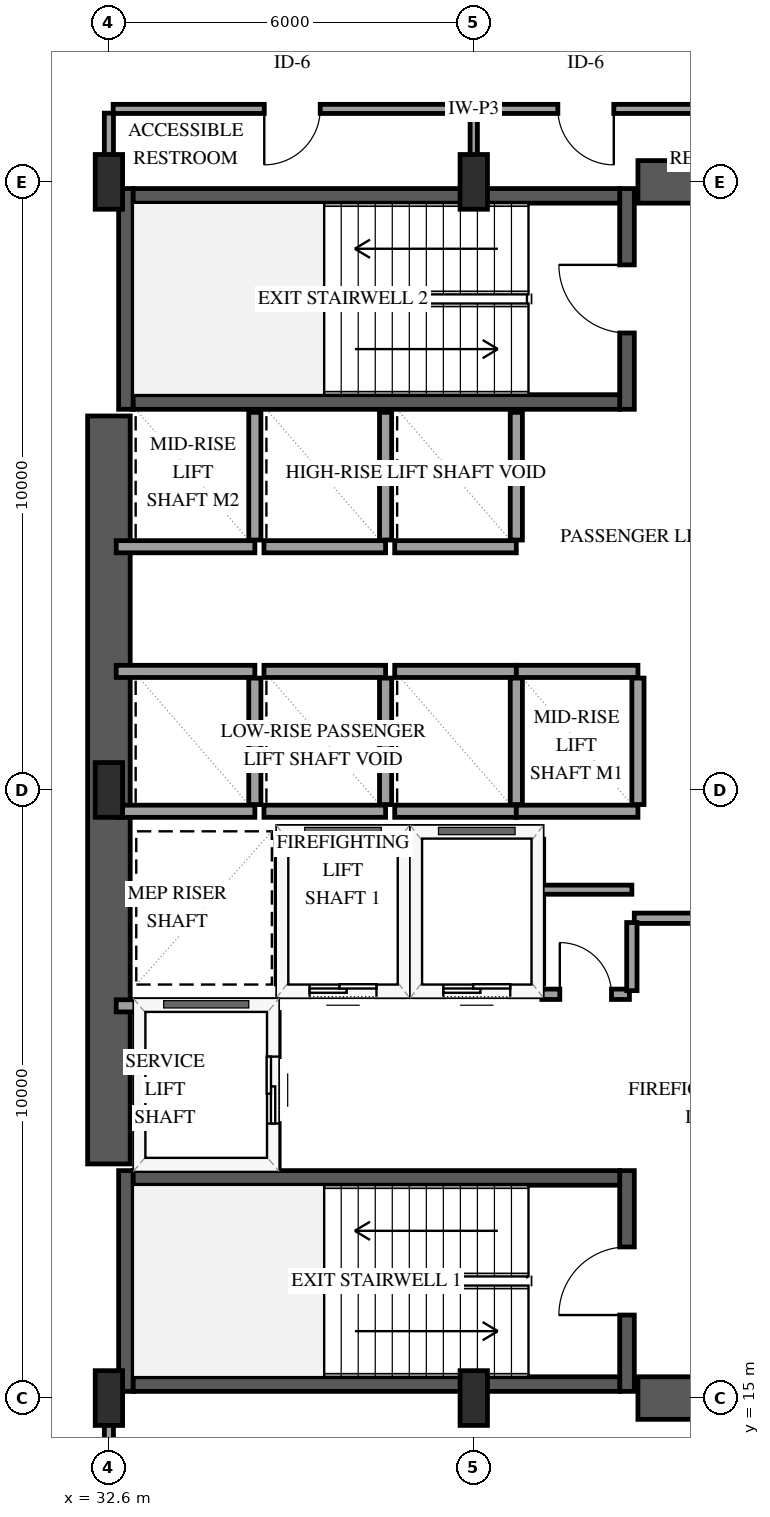
"""IFC4 building model, lengths in metres.
Left out: names, types, materials, properties, quantities, classifications, styles, units other than length and angle.
Written with IfcOpenShell. Run it as: python <this file> out.ifc"""

import sys

from ifc_helpers import new_model, si_unit, direction, frame, frame_2d, origin, origin_2d, place, context, subcontext, project, spatial, rectangle, extrude, element, fill, save


model = new_model("IFC4")
c1 = context("Model", 3, precision=1e-05, world=origin(), true_north=direction((0.0, 1.0)))
c2 = subcontext(c1, "Body", "Model", "MODEL_VIEW")
j1 = project(units=[si_unit("LENGTHUNIT", "METRE"), si_unit("PLANEANGLEUNIT", "RADIAN")], contexts=[c1])
p1 = place(None, origin())
s1 = spatial("IfcSite", under=j1, at=p1, CompositionType="ELEMENT")
p2 = place(p1, origin())
s2 = spatial("IfcBuilding", under=s1, at=p2, CompositionType="ELEMENT")
p3 = place(p2, frame((0.0, 0.0, 20.7)))
s3 = spatial("IfcBuildingStorey", under=s2, at=p3, CompositionType="ELEMENT", Elevation=20.7)
p4 = place(p3, frame((32.88, 15.11, 0.0), z_axis=(0.0, 0.0, 1.0), x_axis=(0.0, 1.0, 0.0)))
e1 = element("IfcWall", 1, at=p4, inside=s3, PredefinedType="SHEAR", context=c2, shape_type="SweptSolid", body=[
    extrude(rectangle(XDim=3.63, YDim=0.24, at=frame_2d((1.815, 0.0))), origin(), (0.0, 0.0, 1.0), 4.5),
])
p5 = place(p3, frame((41.12, 15.11, 0.0), z_axis=(0.0, 0.0, 1.0), x_axis=(0.0, 1.0, 0.0)))
e2 = element("IfcWall", 2, at=p5, inside=s3, PredefinedType="SHEAR", context=c2, shape_type="SweptSolid", body=[
    extrude(rectangle(XDim=3.63, YDim=0.24, at=frame_2d((1.815, 0.0))), origin(), (0.0, 0.0, 1.0), 4.5),
])
p6 = place(p5, frame((1.255, 0.0, 0.0)))
e3 = element("IfcOpeningElement", 3, at=p6, cuts=e2, PredefinedType="OPENING", context=c2, shape_type="SweptSolid", body=[
    extrude(rectangle(XDim=1.12, YDim=2.15, at=frame_2d((0.56, 1.075))), frame((0.0, 0.13, 0.0), z_axis=(0.0, -1.0, 0.0), x_axis=(1.0, 0.0, 0.0)), (0.0, 0.0, 1.0), 0.26),
])
for number, where, z_axis, x_axis in (
    (4, (33.0, 15.23, 0.0), (0.0, 0.0, 1.0), (1.0, 0.0, 0.0)),
    (5, (33.0, 18.62, 0.0), (0.0, 0.0, 1.0), (1.0, 0.0, 0.0)),
):
    element("IfcWall", number, at=place(p3, frame(where, z_axis=z_axis, x_axis=x_axis)), inside=s3, PredefinedType="SHEAR", context=c2, shape_type="SweptSolid", body=[
        extrude(rectangle(XDim=8.0, YDim=0.24, at=frame_2d((4.0, 0.0))), origin(), (0.0, 0.0, 1.0), 4.5),
    ])
p7 = place(p3, frame((32.88, 31.26, 0.0), z_axis=(0.0, 0.0, 1.0), x_axis=(0.0, 1.0, 0.0)))
e6 = element("IfcWall", 6, at=p7, inside=s3, PredefinedType="SHEAR", context=c2, shape_type="SweptSolid", body=[
    extrude(rectangle(XDim=3.63, YDim=0.24, at=frame_2d((1.815, 0.0))), origin(), (0.0, 0.0, 1.0), 4.5),
])
p8 = place(p3, frame((41.12, 31.26, 0.0), z_axis=(0.0, 0.0, 1.0), x_axis=(0.0, 1.0, 0.0)))
e7 = element("IfcWall", 7, at=p8, inside=s3, PredefinedType="SHEAR", context=c2, shape_type="SweptSolid", body=[
    extrude(rectangle(XDim=3.63, YDim=0.24, at=frame_2d((1.815, 0.0))), origin(), (0.0, 0.0, 1.0), 4.5),
])
p9 = place(p8, frame((1.255, 0.0, 0.0)))
e8 = element("IfcOpeningElement", 8, at=p9, cuts=e7, PredefinedType="OPENING", context=c2, shape_type="SweptSolid", body=[
    extrude(rectangle(XDim=1.12, YDim=2.15, at=frame_2d((0.56, 1.075))), frame((0.0, 0.13, 0.0), z_axis=(0.0, -1.0, 0.0), x_axis=(1.0, 0.0, 0.0)), (0.0, 0.0, 1.0), 0.26),
])
for number, where, z_axis, x_axis in (
    (9, (33.0, 31.38, 0.0), (0.0, 0.0, 1.0), (1.0, 0.0, 0.0)),
    (10, (33.0, 34.77, 0.0), (0.0, 0.0, 1.0), (1.0, 0.0, 0.0)),
):
    element("IfcWall", number, at=place(p3, frame(where, z_axis=z_axis, x_axis=x_axis)), inside=s3, PredefinedType="SHEAR", context=c2, shape_type="SweptSolid", body=[
        extrude(rectangle(XDim=8.0, YDim=0.24, at=frame_2d((4.0, 0.0))), origin(), (0.0, 0.0, 1.0), 4.5),
    ])
p10 = place(p3, frame((32.6, 18.85, 0.0), z_axis=(0.0, 0.0, 1.0), x_axis=(0.0, 1.0, 0.0)))
e11 = element("IfcWall", 11, at=p10, inside=s3, PredefinedType="SHEAR", context=c2, shape_type="SweptSolid", body=[
    extrude(rectangle(XDim=12.3, YDim=0.7, at=frame_2d((6.15, 0.0))), origin(), (0.0, 0.0, 1.0), 4.5),
])
for number, where, z_axis, x_axis in (
    (12, (41.3, 15.0, 0.0), (0.0, 0.0, 1.0), (1.0, 0.0, 0.0)),
    (13, (41.3, 35.0, 0.0), (0.0, 0.0, 1.0), (1.0, 0.0, 0.0)),
):
    element("IfcWall", number, at=place(p3, frame(where, z_axis=z_axis, x_axis=x_axis)), inside=s3, PredefinedType="SHEAR", context=c2, shape_type="SweptSolid", body=[
        extrude(rectangle(XDim=2.85, YDim=0.7, at=frame_2d((1.425, 0.0))), origin(), (0.0, 0.0, 1.0), 4.5),
    ])
for number, where, z_axis, x_axis in (
    (14, (32.6, 15.0, 0.0), (0.0, 0.0, 1.0), (1.0, 0.0, 0.0)),
    (15, (32.6, 25.0, 0.0), (0.0, 0.0, 1.0), (1.0, 0.0, 0.0)),
    (16, (32.6, 35.0, 0.0), (0.0, 0.0, 1.0), (1.0, 0.0, 0.0)),
    (17, (38.6, 15.0, 0.0), (0.0, 0.0, 1.0), (1.0, 0.0, 0.0)),
    (18, (38.6, 35.0, 0.0), (0.0, 0.0, 1.0), (1.0, 0.0, 0.0)),
):
    element("IfcColumn", number, at=place(p3, frame(where, z_axis=z_axis, x_axis=x_axis)), inside=s3, PredefinedType="PILASTER", context=c2, shape_type="SweptSolid", body=[
        extrude(rectangle(XDim=0.45, YDim=0.9, at=origin_2d()), origin(), (0.0, 0.0, 1.0), 4.5),
    ])
p11 = place(p3, frame((35.45, 21.7, 0.0), z_axis=(0.0, 0.0, 1.0), x_axis=(1.0, 0.0, 0.0)))
e19 = element("IfcWall", 19, at=p11, inside=s3, PredefinedType="SOLIDWALL", context=c2, shape_type="SweptSolid", body=[
    extrude(rectangle(XDim=2.0, YDim=0.2, at=frame_2d((1.0, 0.0))), origin(), (0.0, 0.0, 1.0), 4.18),
])
p12 = place(p11, frame((0.45, 0.0, 0.0)))
e20 = element("IfcOpeningElement", 20, at=p12, cuts=e19, PredefinedType="OPENING", context=c2, shape_type="SweptSolid", body=[
    extrude(rectangle(XDim=1.1, YDim=2.15, at=frame_2d((0.55, 1.075))), frame((0.0, 0.11, 0.0), z_axis=(0.0, -1.0, 0.0), x_axis=(1.0, 0.0, 0.0)), (0.0, 0.0, 1.0), 0.22),
])
p13 = place(p3, frame((35.45, 24.3, 0.0), z_axis=(0.0, 0.0, 1.0), x_axis=(1.0, 0.0, 0.0)))
e21 = element("IfcWall", 21, at=p13, inside=s3, PredefinedType="SOLIDWALL", context=c2, shape_type="SweptSolid", body=[
    extrude(rectangle(XDim=2.0, YDim=0.2, at=frame_2d((1.0, 0.0))), origin(), (0.0, 0.0, 1.0), 4.18),
])
for number, where, z_axis, x_axis in (
    (22, (35.45, 21.81, 0.0), (0.0, 0.0, 1.0), (0.0, 1.0, 0.0)),
    (23, (37.45, 21.81, 0.0), (0.0, 0.0, 1.0), (0.0, 1.0, 0.0)),
):
    element("IfcWall", number, at=place(p3, frame(where, z_axis=z_axis, x_axis=x_axis)), inside=s3, PredefinedType="SOLIDWALL", context=c2, shape_type="SweptSolid", body=[
        extrude(rectangle(XDim=2.38, YDim=0.2, at=frame_2d((1.19, 0.0))), origin(), (0.0, 0.0, 1.0), 4.18),
    ])
p14 = place(p3, frame((37.65, 21.7, 0.0), z_axis=(0.0, 0.0, 1.0), x_axis=(1.0, 0.0, 0.0)))
e24 = element("IfcWall", 24, at=p14, inside=s3, PredefinedType="SOLIDWALL", context=c2, shape_type="SweptSolid", body=[
    extrude(rectangle(XDim=2.0, YDim=0.2, at=frame_2d((1.0, 0.0))), origin(), (0.0, 0.0, 1.0), 4.18),
])
p15 = place(p14, frame((0.45, 0.0, 0.0)))
e25 = element("IfcOpeningElement", 25, at=p15, cuts=e24, PredefinedType="OPENING", context=c2, shape_type="SweptSolid", body=[
    extrude(rectangle(XDim=1.1, YDim=2.15, at=frame_2d((0.55, 1.075))), frame((0.0, 0.11, 0.0), z_axis=(0.0, -1.0, 0.0), x_axis=(1.0, 0.0, 0.0)), (0.0, 0.0, 1.0), 0.22),
])
p16 = place(p3, frame((37.65, 24.3, 0.0), z_axis=(0.0, 0.0, 1.0), x_axis=(1.0, 0.0, 0.0)))
e26 = element("IfcWall", 26, at=p16, inside=s3, PredefinedType="SOLIDWALL", context=c2, shape_type="SweptSolid", body=[
    extrude(rectangle(XDim=2.0, YDim=0.2, at=frame_2d((1.0, 0.0))), origin(), (0.0, 0.0, 1.0), 4.18),
])
p17 = place(p3, frame((39.65, 21.81, 0.0), z_axis=(0.0, 0.0, 1.0), x_axis=(0.0, 1.0, 0.0)))
e27 = element("IfcWall", 27, at=p17, inside=s3, PredefinedType="SOLIDWALL", context=c2, shape_type="SweptSolid", body=[
    extrude(rectangle(XDim=2.38, YDim=0.2, at=frame_2d((1.19, 0.0))), origin(), (0.0, 0.0, 1.0), 4.18),
])
p18 = place(p3, frame((32.72, 21.45, 0.0), z_axis=(0.0, 0.0, 1.0), x_axis=(1.0, 0.0, 0.0)))
e28 = element("IfcWall", 28, at=p18, inside=s3, PredefinedType="SOLIDWALL", context=c2, shape_type="SweptSolid", body=[
    extrude(rectangle(XDim=2.58, YDim=0.2, at=frame_2d((1.29, 0.0))), origin(), (0.0, 0.0, 1.0), 4.18),
])
p19 = place(p3, frame((35.3, 18.79, 0.0), z_axis=(0.0, 0.0, 1.0), x_axis=(0.0, 1.0, 0.0)))
e29 = element("IfcWall", 29, at=p19, inside=s3, PredefinedType="SOLIDWALL", context=c2, shape_type="SweptSolid", body=[
    extrude(rectangle(XDim=2.55, YDim=0.2, at=frame_2d((1.275, 0.0))), origin(), (0.0, 0.0, 1.0), 4.18),
])
p20 = place(p19, frame((0.725, 0.0, 0.0)))
e30 = element("IfcOpeningElement", 30, at=p20, cuts=e29, PredefinedType="OPENING", context=c2, shape_type="SweptSolid", body=[
    extrude(rectangle(XDim=1.1, YDim=2.15, at=frame_2d((0.55, 1.075))), frame((0.0, 0.11, 0.0), z_axis=(0.0, -1.0, 0.0), x_axis=(1.0, 0.0, 0.0)), (0.0, 0.0, 1.0), 0.22),
])
for number, where, z_axis, x_axis in (
    (31, (32.72, 24.65, 0.0), (0.0, 0.0, 1.0), (1.0, 0.0, 0.0)),
    (32, (32.72, 26.95, 0.0), (0.0, 0.0, 1.0), (1.0, 0.0, 0.0)),
):
    element("IfcWall", number, at=place(p3, frame(where, z_axis=z_axis, x_axis=x_axis)), inside=s3, PredefinedType="SOLIDWALL", context=c2, shape_type="SweptSolid", body=[
        extrude(rectangle(XDim=2.28, YDim=0.2, at=frame_2d((1.14, 0.0))), origin(), (0.0, 0.0, 1.0), 4.18),
    ])
p21 = place(p3, frame((35.0, 24.76, 0.0), z_axis=(0.0, 0.0, 1.0), x_axis=(0.0, 1.0, 0.0)))
e33 = element("IfcWall", 33, at=p21, inside=s3, PredefinedType="SOLIDWALL", context=c2, shape_type="SweptSolid", body=[
    extrude(rectangle(XDim=2.08, YDim=0.2, at=frame_2d((1.04, 0.0))), origin(), (0.0, 0.0, 1.0), 4.18),
])
for number, where, z_axis, x_axis in (
    (34, (35.15, 24.65, 0.0), (0.0, 0.0, 1.0), (1.0, 0.0, 0.0)),
    (35, (35.15, 26.95, 0.0), (0.0, 0.0, 1.0), (1.0, 0.0, 0.0)),
):
    element("IfcWall", number, at=place(p3, frame(where, z_axis=z_axis, x_axis=x_axis)), inside=s3, PredefinedType="SOLIDWALL", context=c2, shape_type="SweptSolid", body=[
        extrude(rectangle(XDim=2.0, YDim=0.2, at=frame_2d((1.0, 0.0))), origin(), (0.0, 0.0, 1.0), 4.18),
    ])
p22 = place(p3, frame((37.15, 24.76, 0.0), z_axis=(0.0, 0.0, 1.0), x_axis=(0.0, 1.0, 0.0)))
e36 = element("IfcWall", 36, at=p22, inside=s3, PredefinedType="SOLIDWALL", context=c2, shape_type="SweptSolid", body=[
    extrude(rectangle(XDim=2.08, YDim=0.2, at=frame_2d((1.04, 0.0))), origin(), (0.0, 0.0, 1.0), 4.18),
])
for number, where, z_axis, x_axis in (
    (37, (37.3, 24.65, 0.0), (0.0, 0.0, 1.0), (1.0, 0.0, 0.0)),
    (38, (37.3, 26.95, 0.0), (0.0, 0.0, 1.0), (1.0, 0.0, 0.0)),
):
    element("IfcWall", number, at=place(p3, frame(where, z_axis=z_axis, x_axis=x_axis)), inside=s3, PredefinedType="SOLIDWALL", context=c2, shape_type="SweptSolid", body=[
        extrude(rectangle(XDim=2.0, YDim=0.2, at=frame_2d((1.0, 0.0))), origin(), (0.0, 0.0, 1.0), 4.18),
    ])
p23 = place(p3, frame((39.3, 24.76, 0.0), z_axis=(0.0, 0.0, 1.0), x_axis=(0.0, 1.0, 0.0)))
e39 = element("IfcWall", 39, at=p23, inside=s3, PredefinedType="SOLIDWALL", context=c2, shape_type="SweptSolid", body=[
    extrude(rectangle(XDim=2.08, YDim=0.2, at=frame_2d((1.04, 0.0))), origin(), (0.0, 0.0, 1.0), 4.18),
])
for number, where, z_axis, x_axis in (
    (40, (39.3, 24.65, 0.0), (0.0, 0.0, 1.0), (1.0, 0.0, 0.0)),
    (41, (39.3, 26.95, 0.0), (0.0, 0.0, 1.0), (1.0, 0.0, 0.0)),
):
    element("IfcWall", number, at=place(p3, frame(where, z_axis=z_axis, x_axis=x_axis)), inside=s3, PredefinedType="SOLIDWALL", context=c2, shape_type="SweptSolid", body=[
        extrude(rectangle(XDim=2.0, YDim=0.2, at=frame_2d((1.0, 0.0))), origin(), (0.0, 0.0, 1.0), 4.18),
    ])
p24 = place(p3, frame((41.3, 24.76, 0.0), z_axis=(0.0, 0.0, 1.0), x_axis=(0.0, 1.0, 0.0)))
e42 = element("IfcWall", 42, at=p24, inside=s3, PredefinedType="SOLIDWALL", context=c2, shape_type="SweptSolid", body=[
    extrude(rectangle(XDim=2.08, YDim=0.2, at=frame_2d((1.04, 0.0))), origin(), (0.0, 0.0, 1.0), 4.18),
])
p25 = place(p3, frame((32.72, 29.0, 0.0), z_axis=(0.0, 0.0, 1.0), x_axis=(1.0, 0.0, 0.0)))
e43 = element("IfcWall", 43, at=p25, inside=s3, PredefinedType="SOLIDWALL", context=c2, shape_type="SweptSolid", body=[
    extrude(rectangle(XDim=2.28, YDim=0.2, at=frame_2d((1.14, 0.0))), origin(), (0.0, 0.0, 1.0), 4.18),
])
p26 = place(p3, frame((35.0, 29.11, 0.0), z_axis=(0.0, 0.0, 1.0), x_axis=(0.0, 1.0, 0.0)))
e44 = element("IfcWall", 44, at=p26, inside=s3, PredefinedType="SOLIDWALL", context=c2, shape_type="SweptSolid", body=[
    extrude(rectangle(XDim=2.1, YDim=0.2, at=frame_2d((1.05, 0.0))), origin(), (0.0, 0.0, 1.0), 4.18),
])
p27 = place(p3, frame((35.15, 29.0, 0.0), z_axis=(0.0, 0.0, 1.0), x_axis=(1.0, 0.0, 0.0)))
e45 = element("IfcWall", 45, at=p27, inside=s3, PredefinedType="SOLIDWALL", context=c2, shape_type="SweptSolid", body=[
    extrude(rectangle(XDim=2.0, YDim=0.2, at=frame_2d((1.0, 0.0))), origin(), (0.0, 0.0, 1.0), 4.18),
])
p28 = place(p3, frame((37.15, 29.11, 0.0), z_axis=(0.0, 0.0, 1.0), x_axis=(0.0, 1.0, 0.0)))
e46 = element("IfcWall", 46, at=p28, inside=s3, PredefinedType="SOLIDWALL", context=c2, shape_type="SweptSolid", body=[
    extrude(rectangle(XDim=2.1, YDim=0.2, at=frame_2d((1.05, 0.0))), origin(), (0.0, 0.0, 1.0), 4.18),
])
p29 = place(p3, frame((37.3, 29.0, 0.0), z_axis=(0.0, 0.0, 1.0), x_axis=(1.0, 0.0, 0.0)))
e47 = element("IfcWall", 47, at=p29, inside=s3, PredefinedType="SOLIDWALL", context=c2, shape_type="SweptSolid", body=[
    extrude(rectangle(XDim=2.0, YDim=0.2, at=frame_2d((1.0, 0.0))), origin(), (0.0, 0.0, 1.0), 4.18),
])
p30 = place(p3, frame((39.3, 29.11, 0.0), z_axis=(0.0, 0.0, 1.0), x_axis=(0.0, 1.0, 0.0)))
e48 = element("IfcWall", 48, at=p30, inside=s3, PredefinedType="SOLIDWALL", context=c2, shape_type="SweptSolid", body=[
    extrude(rectangle(XDim=2.1, YDim=0.2, at=frame_2d((1.05, 0.0))), origin(), (0.0, 0.0, 1.0), 4.18),
])
p31 = place(p3, frame((32.6, 14.93, 0.0), z_axis=(0.0, 0.0, 1.0), x_axis=(0.0, -1.0, 0.0)))
e49 = element("IfcWall", 49, at=p31, inside=s3, PredefinedType="PARTITIONING", context=c2, shape_type="SweptSolid", body=[
    extrude(rectangle(XDim=7.86, YDim=0.15, at=frame_2d((3.93, 0.0))), origin(), (0.0, 0.0, 1.0), 3.302),
])
p32 = place(p3, frame((38.53, 36.2, 0.0), z_axis=(0.0, 0.0, 1.0), x_axis=(-1.0, 0.0, 0.0)))
e50 = element("IfcWall", 50, at=p32, inside=s3, PredefinedType="PARTITIONING", context=c2, shape_type="SweptSolid", body=[
    extrude(rectangle(XDim=5.86, YDim=0.15, at=frame_2d((2.93, 0.0))), origin(), (0.0, 0.0, 1.0), 4.18),
])
p33 = place(p32, frame((2.455, 0.0, 0.0)))
e51 = element("IfcOpeningElement", 51, at=p33, cuts=e50, PredefinedType="OPENING", context=c2, shape_type="SweptSolid", body=[
    extrude(rectangle(XDim=0.92, YDim=2.12, at=frame_2d((0.46, 1.06))), frame((0.0, 0.085, 0.0), z_axis=(0.0, -1.0, 0.0), x_axis=(1.0, 0.0, 0.0)), (0.0, 0.0, 1.0), 0.17),
])
p34 = place(p3, frame((44.53, 36.2, 0.0), z_axis=(0.0, 0.0, 1.0), x_axis=(-1.0, 0.0, 0.0)))
e52 = element("IfcWall", 52, at=p34, inside=s3, PredefinedType="PARTITIONING", context=c2, shape_type="SweptSolid", body=[
    extrude(rectangle(XDim=5.86, YDim=0.15, at=frame_2d((2.93, 0.0))), origin(), (0.0, 0.0, 1.0), 4.18),
])
p35 = place(p34, frame((3.627, 0.0, 0.0)))
e53 = element("IfcOpeningElement", 53, at=p35, cuts=e52, PredefinedType="OPENING", context=c2, shape_type="SweptSolid", body=[
    extrude(rectangle(XDim=0.92, YDim=2.12, at=frame_2d((0.46, 1.06))), frame((0.0, 0.085, 0.0), z_axis=(0.0, -1.0, 0.0), x_axis=(1.0, 0.0, 0.0)), (0.0, 0.0, 1.0), 0.17),
])
p36 = place(p3, frame((41.24, 22.89, 0.0), z_axis=(0.0, 0.0, 1.0), x_axis=(1.0, 0.0, 0.0)))
e54 = element("IfcWall", 54, at=p36, inside=s3, PredefinedType="PARTITIONING", context=c2, shape_type="SweptSolid", body=[
    extrude(rectangle(XDim=3.32, YDim=0.17, at=frame_2d((1.66, 0.0))), origin(), (0.0, 0.0, 1.0), 4.18),
])
p37 = place(p36, frame((1.12, 0.0, 0.0)))
e55 = element("IfcOpeningElement", 55, at=p37, cuts=e54, PredefinedType="OPENING", context=c2, shape_type="SweptSolid", body=[
    extrude(rectangle(XDim=1.08, YDim=2.15, at=frame_2d((0.54, 1.075))), frame((0.0, 0.095, 0.0), z_axis=(0.0, -1.0, 0.0), x_axis=(1.0, 0.0, 0.0)), (0.0, 0.0, 1.0), 0.19),
])
p38 = place(p3, frame((39.72, 21.64, 0.0), z_axis=(0.0, 0.0, 1.0), x_axis=(1.0, 0.0, 0.0)))
e56 = element("IfcWall", 56, at=p38, inside=s3, PredefinedType="PARTITIONING", context=c2, shape_type="SweptSolid", body=[
    extrude(rectangle(XDim=1.44, YDim=0.17, at=frame_2d((0.72, 0.0))), origin(), (0.0, 0.0, 1.0), 4.18),
])
p39 = place(p38, frame((0.295, 0.0, 0.0)))
e57 = element("IfcOpeningElement", 57, at=p39, cuts=e56, PredefinedType="OPENING", context=c2, shape_type="SweptSolid", body=[
    extrude(rectangle(XDim=0.85, YDim=2.1, at=frame_2d((0.425, 1.05))), frame((0.0, 0.095, 0.0), z_axis=(0.0, -1.0, 0.0), x_axis=(1.0, 0.0, 0.0)), (0.0, 0.0, 1.0), 0.19),
])
p40 = place(p3, frame((41.2, 21.7, 0.0), z_axis=(0.0, 0.0, 1.0), x_axis=(0.0, 1.0, 0.0)))
e58 = element("IfcWall", 58, at=p40, inside=s3, PredefinedType="PARTITIONING", context=c2, shape_type="SweptSolid", body=[
    extrude(rectangle(XDim=1.12, YDim=0.17, at=frame_2d((0.56, 0.0))), origin(), (0.0, 0.0, 1.0), 4.18),
])
p41 = place(p3, frame((32.6, 36.13, 0.0), z_axis=(0.0, 0.0, 1.0), x_axis=(0.0, -1.0, 0.0)))
e59 = element("IfcWall", 59, at=p41, inside=s3, PredefinedType="PARTITIONING", context=c2, shape_type="SweptSolid", body=[
    extrude(rectangle(XDim=1.06, YDim=0.15, at=frame_2d((0.53, 0.0))), origin(), (0.0, 0.0, 1.0), 3.302),
])
p42 = place(p3, frame((38.6, 36.13, 0.0), z_axis=(0.0, 0.0, 1.0), x_axis=(0.0, -1.0, 0.0)))
e60 = element("IfcWall", 60, at=p42, inside=s3, PredefinedType="PARTITIONING", context=c2, shape_type="SweptSolid", body=[
    extrude(rectangle(XDim=1.06, YDim=0.12, at=frame_2d((0.53, 0.0))), origin(), (0.0, 0.0, 1.0), 4.18),
])
p43 = place(p3, frame((41.2, 23.36, 0.0), z_axis=(0.0, 0.0, 1.0), x_axis=(-1.0, 0.0, 0.0)))
e61 = element("IfcWall", 61, at=p43, inside=s3, PredefinedType="PARTITIONING", context=c2, shape_type="SweptSolid", body=[
    extrude(rectangle(XDim=1.48, YDim=0.15, at=frame_2d((0.74, 0.0))), origin(), (0.0, 0.0, 1.0), 4.18),
])
p44 = place(p12, origin())
e62 = element("IfcDoor", 62, at=p44, inside=s3, OperationType="SLIDING_TO_LEFT", PredefinedType="DOOR", context=c2, shape_type="SweptSolid", body=[
    extrude(rectangle(XDim=1.1, YDim=2.15, at=frame_2d((0.55, 1.075))), frame((0.0, 0.025, 0.0), z_axis=(0.0, -1.0, 0.0), x_axis=(1.0, 0.0, 0.0)), (0.0, 0.0, 1.0), 0.05),
])
fill(e20, e62)
p45 = place(p15, origin())
e63 = element("IfcDoor", 63, at=p45, inside=s3, OperationType="SLIDING_TO_LEFT", PredefinedType="DOOR", context=c2, shape_type="SweptSolid", body=[
    extrude(rectangle(XDim=1.1, YDim=2.15, at=frame_2d((0.55, 1.075))), frame((0.0, 0.025, 0.0), z_axis=(0.0, -1.0, 0.0), x_axis=(1.0, 0.0, 0.0)), (0.0, 0.0, 1.0), 0.05),
])
fill(e25, e63)
p46 = place(p20, origin())
e64 = element("IfcDoor", 64, at=p46, inside=s3, OperationType="SLIDING_TO_LEFT", PredefinedType="DOOR", context=c2, shape_type="SweptSolid", body=[
    extrude(rectangle(XDim=1.1, YDim=2.15, at=frame_2d((0.55, 1.075))), frame((0.0, 0.025, 0.0), z_axis=(0.0, -1.0, 0.0), x_axis=(1.0, 0.0, 0.0)), (0.0, 0.0, 1.0), 0.05),
])
fill(e30, e64)
p47 = place(p6, origin())
e65 = element("IfcDoor", 65, at=p47, inside=s3, OperationType="SINGLE_SWING_LEFT", PredefinedType="DOOR", context=c2, shape_type="SweptSolid", body=[
    extrude(rectangle(XDim=1.12, YDim=2.15, at=frame_2d((0.56, 1.075))), frame((0.0, 0.025, 0.0), z_axis=(0.0, -1.0, 0.0), x_axis=(1.0, 0.0, 0.0)), (0.0, 0.0, 1.0), 0.05),
])
fill(e3, e65)
p48 = place(p9, origin())
e66 = element("IfcDoor", 66, at=p48, inside=s3, OperationType="SINGLE_SWING_RIGHT", PredefinedType="DOOR", context=c2, shape_type="SweptSolid", body=[
    extrude(rectangle(XDim=1.12, YDim=2.15, at=frame_2d((0.56, 1.075))), frame((0.0, 0.025, 0.0), z_axis=(0.0, -1.0, 0.0), x_axis=(1.0, 0.0, 0.0)), (0.0, 0.0, 1.0), 0.05),
])
fill(e8, e66)
p49 = place(p33, origin())
e67 = element("IfcDoor", 67, at=p49, inside=s3, OperationType="SINGLE_SWING_RIGHT", PredefinedType="DOOR", context=c2, shape_type="SweptSolid", body=[
    extrude(rectangle(XDim=0.92, YDim=2.12, at=frame_2d((0.46, 1.06))), frame((0.0, 0.025, 0.0), z_axis=(0.0, -1.0, 0.0), x_axis=(1.0, 0.0, 0.0)), (0.0, 0.0, 1.0), 0.05),
])
fill(e51, e67)
p50 = place(p35, origin())
e68 = element("IfcDoor", 68, at=p50, inside=s3, OperationType="SINGLE_SWING_LEFT", PredefinedType="DOOR", context=c2, shape_type="SweptSolid", body=[
    extrude(rectangle(XDim=0.92, YDim=2.12, at=frame_2d((0.46, 1.06))), frame((0.0, 0.025, 0.0), z_axis=(0.0, -1.0, 0.0), x_axis=(1.0, 0.0, 0.0)), (0.0, 0.0, 1.0), 0.05),
])
fill(e53, e68)
p51 = place(p39, origin())
e69 = element("IfcDoor", 69, at=p51, inside=s3, OperationType="SINGLE_SWING_LEFT", PredefinedType="DOOR", context=c2, shape_type="SweptSolid", body=[
    extrude(rectangle(XDim=0.85, YDim=2.1, at=frame_2d((0.425, 1.05))), frame((0.0, 0.025, 0.0), z_axis=(0.0, -1.0, 0.0), x_axis=(1.0, 0.0, 0.0)), (0.0, 0.0, 1.0), 0.05),
])
fill(e57, e69)
save(model, sys.argv[1])
